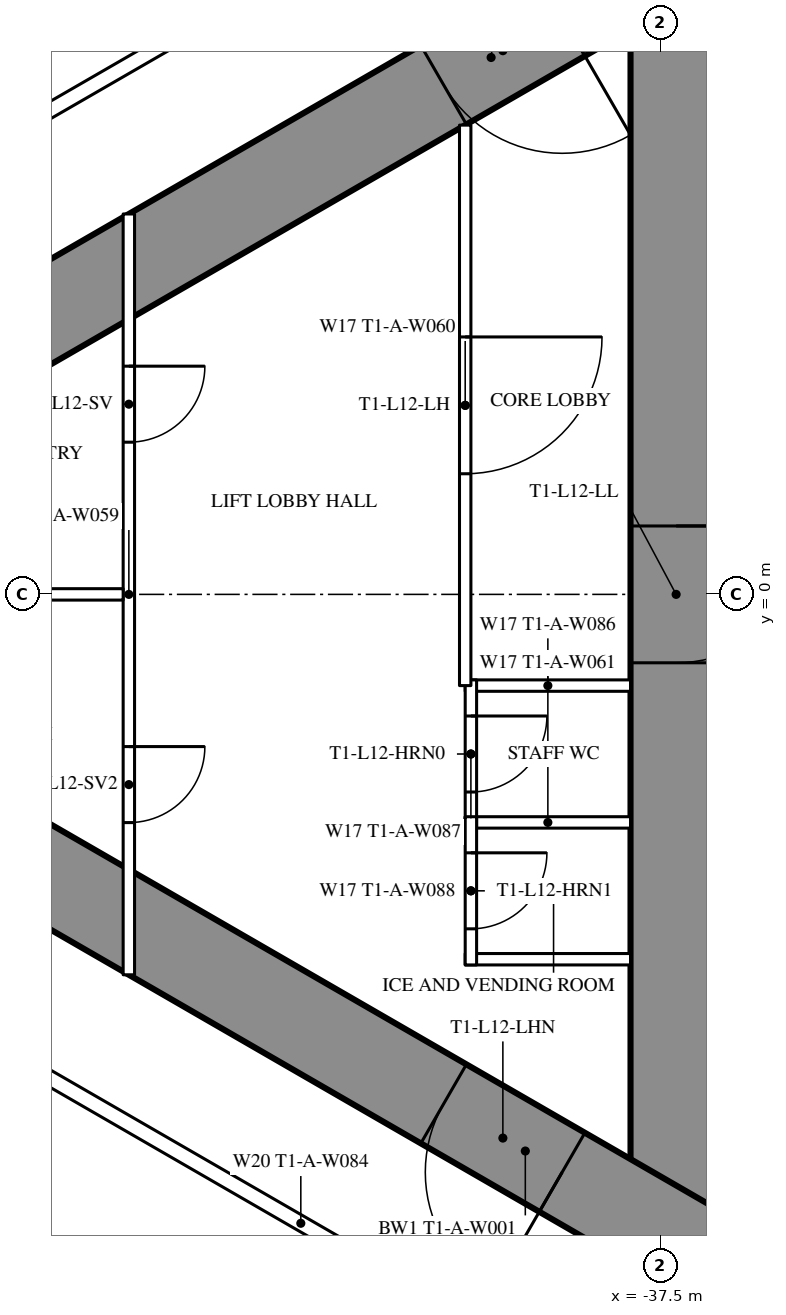
"""IFC4 building model, lengths in metres.
Left out: names, types, materials, properties, quantities, classifications, styles, units other than length and angle.
Written with IfcOpenShell. Run it as: python <this file> out.ifc"""

import sys

from ifc_helpers import new_model, si_unit, direction, frame, frame_2d, origin, place, context, subcontext, project, spatial, rectangle, extrude, element, fill, save


model = new_model("IFC4")
c1 = context("Model", 3, precision=1e-05, world=origin(), true_north=direction((0.0, 1.0)))
c2 = subcontext(c1, "Body", "Model", "MODEL_VIEW")
j1 = project(units=[si_unit("LENGTHUNIT", "METRE"), si_unit("PLANEANGLEUNIT", "RADIAN")], contexts=[c1])
p1 = place(None, origin())
s1 = spatial("IfcSite", under=j1, at=p1, CompositionType="ELEMENT")
p2 = place(p1, origin())
s2 = spatial("IfcBuilding", under=s1, at=p2, CompositionType="ELEMENT")
p3 = place(p2, frame((0.0, 0.0, 49.5)))
s3 = spatial("IfcBuildingStorey", under=s2, at=p3, CompositionType="ELEMENT", Elevation=49.5)
p4 = place(p3, frame((-37.3, 8.6, 0.0), z_axis=(0.0, 0.0, 1.0), x_axis=(0.0, -1.0, 0.0)))
e1 = element("IfcWall", 1, at=p4, inside=s3, PredefinedType="SHEAR", context=c2, shape_type="SweptSolid", body=[
    extrude(rectangle(XDim=17.2, YDim=1.2, at=frame_2d((8.6, 0.0))), origin(), (0.0, 0.0, 1.0), 3.5),
])
p5 = place(p4, frame((7.7, 0.0, 0.0)))
e2 = element("IfcOpeningElement", 2, at=p5, cuts=e1, PredefinedType="OPENING", context=c2, shape_type="SweptSolid", body=[
    extrude(rectangle(XDim=1.8, YDim=2.2, at=frame_2d((0.9, 1.1))), frame((0.0, 0.61, 0.0), z_axis=(0.0, -1.0, 0.0), x_axis=(1.0, 0.0, 0.0)), (0.0, 0.0, 1.0), 1.22),
])
p6 = place(p3, frame((-27.2, 14.3, 0.0), z_axis=(0.0, 0.0, 1.0), x_axis=(-0.866026593062, -0.499997940104, 0.0)))
e3 = element("IfcWall", 3, at=p6, inside=s3, PredefinedType="SHEAR", context=c2, shape_type="SweptSolid", body=[
    extrude(rectangle(XDim=28.946, YDim=1.2, at=frame_2d((14.473, 0.0))), origin(), (0.0, 0.0, 1.0), 3.5),
])
p7 = place(p6, frame((4.6, 0.0, 0.0)))
e4 = element("IfcOpeningElement", 4, at=p7, cuts=e3, PredefinedType="OPENING", context=c2, shape_type="SweptSolid", body=[
    extrude(rectangle(XDim=1.0, YDim=2.2, at=frame_2d((0.5, 1.1))), frame((0.0, 0.61, 0.0), z_axis=(0.0, -1.0, 0.0), x_axis=(1.0, 0.0, 0.0)), (0.0, 0.0, 1.0), 1.22),
])
p8 = place(p6, frame((13.395, 0.0, 0.0)))
e5 = element("IfcOpeningElement", 5, at=p8, cuts=e3, PredefinedType="OPENING", context=c2, shape_type="SweptSolid", body=[
    extrude(rectangle(XDim=1.8, YDim=2.2, at=frame_2d((0.9, 1.1))), frame((0.0, 0.61, 0.0), z_axis=(0.0, -1.0, 0.0), x_axis=(1.0, 0.0, 0.0)), (0.0, 0.0, 1.0), 1.22),
])
p9 = place(p3, frame((-27.2, -14.3, 0.0), z_axis=(0.0, 0.0, 1.0), x_axis=(-0.866024021859, 0.500002393557, 0.0)))
e6 = element("IfcWall", 6, at=p9, inside=s3, PredefinedType="SHEAR", context=c2, shape_type="SweptSolid", body=[
    extrude(rectangle(XDim=27.907, YDim=1.2, at=frame_2d((13.954, 0.0))), origin(), (0.0, 0.0, 1.0), 3.5),
])
p10 = place(p9, frame((4.6, 0.0, 0.0)))
e7 = element("IfcOpeningElement", 7, at=p10, cuts=e6, PredefinedType="OPENING", context=c2, shape_type="SweptSolid", body=[
    extrude(rectangle(XDim=1.0, YDim=2.2, at=frame_2d((0.5, 1.1))), frame((0.0, 0.61, 0.0), z_axis=(0.0, -1.0, 0.0), x_axis=(1.0, 0.0, 0.0)), (0.0, 0.0, 1.0), 1.22),
])
p11 = place(p9, frame((13.395, 0.0, 0.0)))
e8 = element("IfcOpeningElement", 8, at=p11, cuts=e6, PredefinedType="OPENING", context=c2, shape_type="SweptSolid", body=[
    extrude(rectangle(XDim=1.8, YDim=2.2, at=frame_2d((0.9, 1.1))), frame((0.0, 0.61, 0.0), z_axis=(0.0, -1.0, 0.0), x_axis=(1.0, 0.0, 0.0)), (0.0, 0.0, 1.0), 1.22),
])
p12 = place(p3, frame((-37.7, 10.894, 0.0), z_axis=(0.0, 0.0, 1.0), x_axis=(-0.866027905338, -0.499995667157, 0.0)))
e9 = element("IfcWall", 9, at=p12, inside=s3, PredefinedType="PARTITIONING", context=c2, shape_type="SweptSolid", body=[
    extrude(rectangle(XDim=21.787, YDim=0.2, at=frame_2d((10.894, 0.0))), origin(), (0.0, 0.0, 1.0), 3.25),
])
p13 = place(p12, frame((20.237, 0.0, 0.0)))
e10 = element("IfcOpeningElement", 10, at=p13, cuts=e9, PredefinedType="OPENING", context=c2, shape_type="SweptSolid", body=[
    extrude(rectangle(XDim=0.95, YDim=2.2, at=frame_2d((0.475, 1.1))), frame((0.0, 0.11, 0.0), z_axis=(0.0, -1.0, 0.0), x_axis=(1.0, 0.0, 0.0)), (0.0, 0.0, 1.0), 0.22),
])
p14 = place(p12, frame((2.95, 0.0, 0.0)))
e11 = element("IfcOpeningElement", 11, at=p14, cuts=e9, PredefinedType="OPENING", context=c2, shape_type="SweptSolid", body=[
    extrude(rectangle(XDim=0.95, YDim=2.2, at=frame_2d((0.475, 1.1))), frame((0.0, 0.11, 0.0), z_axis=(0.0, -1.0, 0.0), x_axis=(1.0, 0.0, 0.0)), (0.0, 0.0, 1.0), 0.22),
])
p15 = place(p3, frame((-36.92, -11.344, 0.0), z_axis=(0.0, 0.0, 1.0), x_axis=(-0.866025017052, 0.500000669839, 0.0)))
e12 = element("IfcWall", 12, at=p15, inside=s3, PredefinedType="PARTITIONING", context=c2, shape_type="SweptSolid", body=[
    extrude(rectangle(XDim=12.28, YDim=0.2, at=frame_2d((6.14, 0.0))), origin(), (0.0, 0.0, 1.0), 3.25),
])
p16 = place(p15, frame((3.35, 0.0, 0.0)))
e13 = element("IfcOpeningElement", 13, at=p16, cuts=e12, PredefinedType="OPENING", context=c2, shape_type="SweptSolid", body=[
    extrude(rectangle(XDim=1.0, YDim=2.2, at=frame_2d((0.5, 1.1))), frame((0.0, 0.11, 0.0), z_axis=(0.0, -1.0, 0.0), x_axis=(1.0, 0.0, 0.0)), (0.0, 0.0, 1.0), 0.22),
])
for number, where, z_axis, x_axis in (
    (14, (-37.9, -1.2, 0.0), (0.0, 0.0, 1.0), (-1.0, 0.0, 0.0)),
    (15, (-37.9, -3.0, 0.0), (0.0, 0.0, 1.0), (-1.0, 0.0, 0.0)),
    (16, (-37.9, -4.8, 0.0), (0.0, 0.0, 1.0), (-1.0, 0.0, 0.0)),
):
    element("IfcWall", number, at=place(p3, frame(where, z_axis=z_axis, x_axis=x_axis)), inside=s3, PredefinedType="PARTITIONING", context=c2, shape_type="SweptSolid", body=[
        extrude(rectangle(XDim=2.175, YDim=0.15, at=frame_2d((1.087, 0.0))), origin(), (0.0, 0.0, 1.0), 3.25),
    ])
p17 = place(p3, frame((-40.0, -1.125, 0.0), z_axis=(0.0, 0.0, 1.0), x_axis=(0.0, -1.0, 0.0)))
e17 = element("IfcWall", 17, at=p17, inside=s3, PredefinedType="PARTITIONING", context=c2, shape_type="SweptSolid", body=[
    extrude(rectangle(XDim=1.95, YDim=0.15, at=frame_2d((0.975, 0.0))), origin(), (0.0, 0.0, 1.0), 3.25),
])
p18 = place(p17, frame((0.475, 0.0, 0.0)))
e18 = element("IfcOpeningElement", 18, at=p18, cuts=e17, PredefinedType="OPENING", context=c2, shape_type="SweptSolid", body=[
    extrude(rectangle(XDim=1.0, YDim=2.2, at=frame_2d((0.5, 1.1))), frame((0.0, 0.085, 0.0), z_axis=(0.0, -1.0, 0.0), x_axis=(1.0, 0.0, 0.0)), (0.0, 0.0, 1.0), 0.17),
])
p19 = place(p3, frame((-40.0, -2.925, 0.0), z_axis=(0.0, 0.0, 1.0), x_axis=(0.0, -1.0, 0.0)))
e19 = element("IfcWall", 19, at=p19, inside=s3, PredefinedType="PARTITIONING", context=c2, shape_type="SweptSolid", body=[
    extrude(rectangle(XDim=1.95, YDim=0.15, at=frame_2d((0.975, 0.0))), origin(), (0.0, 0.0, 1.0), 3.25),
])
p20 = place(p19, frame((0.475, 0.0, 0.0)))
e20 = element("IfcOpeningElement", 20, at=p20, cuts=e19, PredefinedType="OPENING", context=c2, shape_type="SweptSolid", body=[
    extrude(rectangle(XDim=1.0, YDim=2.2, at=frame_2d((0.5, 1.1))), frame((0.0, 0.085, 0.0), z_axis=(0.0, -1.0, 0.0), x_axis=(1.0, 0.0, 0.0)), (0.0, 0.0, 1.0), 0.17),
])
p21 = place(p3, frame((-40.075, 6.174, 0.0), z_axis=(0.0, 0.0, 1.0), x_axis=(0.0, -1.0, 0.0)))
e21 = element("IfcWall", 21, at=p21, inside=s3, PredefinedType="PARTITIONING", context=c2, shape_type="SweptSolid", body=[
    extrude(rectangle(XDim=7.374, YDim=0.15, at=frame_2d((3.687, 0.0))), origin(), (0.0, 0.0, 1.0), 3.25),
])
p22 = place(p21, frame((2.787, 0.0, 0.0)))
e22 = element("IfcOpeningElement", 22, at=p22, cuts=e21, PredefinedType="OPENING", context=c2, shape_type="SweptSolid", body=[
    extrude(rectangle(XDim=1.8, YDim=2.2, at=frame_2d((0.9, 1.1))), frame((0.0, 0.085, 0.0), z_axis=(0.0, -1.0, 0.0), x_axis=(1.0, 0.0, 0.0)), (0.0, 0.0, 1.0), 0.17),
])
p23 = place(p3, frame((-44.5, 5.005, 0.0), z_axis=(0.0, 0.0, 1.0), x_axis=(0.0, -1.0, 0.0)))
e23 = element("IfcWall", 23, at=p23, inside=s3, PredefinedType="PARTITIONING", context=c2, shape_type="SweptSolid", body=[
    extrude(rectangle(XDim=10.009, YDim=0.15, at=frame_2d((5.005, 0.0))), origin(), (0.0, 0.0, 1.0), 2.45),
])
p24 = place(p23, frame((2.002, 0.0, 0.0)))
e24 = element("IfcOpeningElement", 24, at=p24, cuts=e23, PredefinedType="OPENING", context=c2, shape_type="SweptSolid", body=[
    extrude(rectangle(XDim=1.0, YDim=2.2, at=frame_2d((0.5, 1.1))), frame((0.0, 0.085, 0.0), z_axis=(0.0, -1.0, 0.0), x_axis=(1.0, 0.0, 0.0)), (0.0, 0.0, 1.0), 0.17),
])
p25 = place(p23, frame((7.007, 0.0, 0.0)))
e25 = element("IfcOpeningElement", 25, at=p25, cuts=e23, PredefinedType="OPENING", context=c2, shape_type="SweptSolid", body=[
    extrude(rectangle(XDim=1.0, YDim=2.2, at=frame_2d((0.5, 1.1))), frame((0.0, 0.085, 0.0), z_axis=(0.0, -1.0, 0.0), x_axis=(1.0, 0.0, 0.0)), (0.0, 0.0, 1.0), 0.17),
])
p26 = place(p3, frame((-44.575, 0.0, 0.0), z_axis=(0.0, 0.0, 1.0), x_axis=(-1.0, 0.0, 0.0)))
e26 = element("IfcWall", 26, at=p26, inside=s3, PredefinedType="PARTITIONING", context=c2, shape_type="SweptSolid", body=[
    extrude(rectangle(XDim=8.593, YDim=0.15, at=frame_2d((4.297, 0.0))), origin(), (0.0, 0.0, 1.0), 2.25),
])
p27 = place(p18, origin())
e27 = element("IfcDoor", 27, at=p27, inside=s3, OperationType="SINGLE_SWING_LEFT", PredefinedType="DOOR", context=c2, shape_type="SweptSolid", body=[
    extrude(rectangle(XDim=1.0, YDim=2.2, at=frame_2d((0.5, 1.1))), frame((0.0, 0.025, 0.0), z_axis=(0.0, -1.0, 0.0), x_axis=(1.0, 0.0, 0.0)), (0.0, 0.0, 1.0), 0.05),
])
fill(e18, e27)
p28 = place(p20, origin())
e28 = element("IfcDoor", 28, at=p28, inside=s3, OperationType="SINGLE_SWING_LEFT", PredefinedType="DOOR", context=c2, shape_type="SweptSolid", body=[
    extrude(rectangle(XDim=1.0, YDim=2.2, at=frame_2d((0.5, 1.1))), frame((0.0, 0.025, 0.0), z_axis=(0.0, -1.0, 0.0), x_axis=(1.0, 0.0, 0.0)), (0.0, 0.0, 1.0), 0.05),
])
fill(e20, e28)
p29 = place(p22, origin())
e29 = element("IfcDoor", 29, at=p29, inside=s3, OperationType="DOUBLE_DOOR_SINGLE_SWING", PredefinedType="DOOR", context=c2, shape_type="SweptSolid", body=[
    extrude(rectangle(XDim=1.8, YDim=2.2, at=frame_2d((0.9, 1.1))), frame((0.0, 0.025, 0.0), z_axis=(0.0, -1.0, 0.0), x_axis=(1.0, 0.0, 0.0)), (0.0, 0.0, 1.0), 0.05),
])
fill(e22, e29)
p30 = place(p24, origin())
e30 = element("IfcDoor", 30, at=p30, inside=s3, OperationType="SINGLE_SWING_LEFT", PredefinedType="DOOR", context=c2, shape_type="SweptSolid", body=[
    extrude(rectangle(XDim=1.0, YDim=2.2, at=frame_2d((0.5, 1.1))), frame((0.0, 0.025, 0.0), z_axis=(0.0, -1.0, 0.0), x_axis=(1.0, 0.0, 0.0)), (0.0, 0.0, 1.0), 0.05),
])
fill(e24, e30)
p31 = place(p25, origin())
e31 = element("IfcDoor", 31, at=p31, inside=s3, OperationType="SINGLE_SWING_LEFT", PredefinedType="DOOR", context=c2, shape_type="SweptSolid", body=[
    extrude(rectangle(XDim=1.0, YDim=2.2, at=frame_2d((0.5, 1.1))), frame((0.0, 0.025, 0.0), z_axis=(0.0, -1.0, 0.0), x_axis=(1.0, 0.0, 0.0)), (0.0, 0.0, 1.0), 0.05),
])
fill(e25, e31)
p32 = place(p8, origin())
e32 = element("IfcDoor", 32, at=p32, inside=s3, OperationType="DOUBLE_DOOR_SINGLE_SWING", PredefinedType="DOOR", context=c2, shape_type="SweptSolid", body=[
    extrude(rectangle(XDim=1.8, YDim=2.2, at=frame_2d((0.9, 1.1))), frame((0.0, 0.025, 0.0), z_axis=(0.0, -1.0, 0.0), x_axis=(1.0, 0.0, 0.0)), (0.0, 0.0, 1.0), 0.05),
])
fill(e5, e32)
p33 = place(p11, origin())
e33 = element("IfcDoor", 33, at=p33, inside=s3, OperationType="DOUBLE_DOOR_SINGLE_SWING", PredefinedType="DOOR", context=c2, shape_type="SweptSolid", body=[
    extrude(rectangle(XDim=1.8, YDim=2.2, at=frame_2d((0.9, 1.1))), frame((0.0, 0.025, 0.0), z_axis=(0.0, -1.0, 0.0), x_axis=(1.0, 0.0, 0.0)), (0.0, 0.0, 1.0), 0.05),
])
fill(e8, e33)
p34 = place(p5, origin())
e34 = element("IfcDoor", 34, at=p34, inside=s3, OperationType="DOUBLE_DOOR_SINGLE_SWING", PredefinedType="DOOR", context=c2, shape_type="SweptSolid", body=[
    extrude(rectangle(XDim=1.8, YDim=2.2, at=frame_2d((0.9, 1.1))), frame((0.0, 0.025, 0.0), z_axis=(0.0, -1.0, 0.0), x_axis=(1.0, 0.0, 0.0)), (0.0, 0.0, 1.0), 0.05),
])
fill(e2, e34)
save(model, sys.argv[1])
